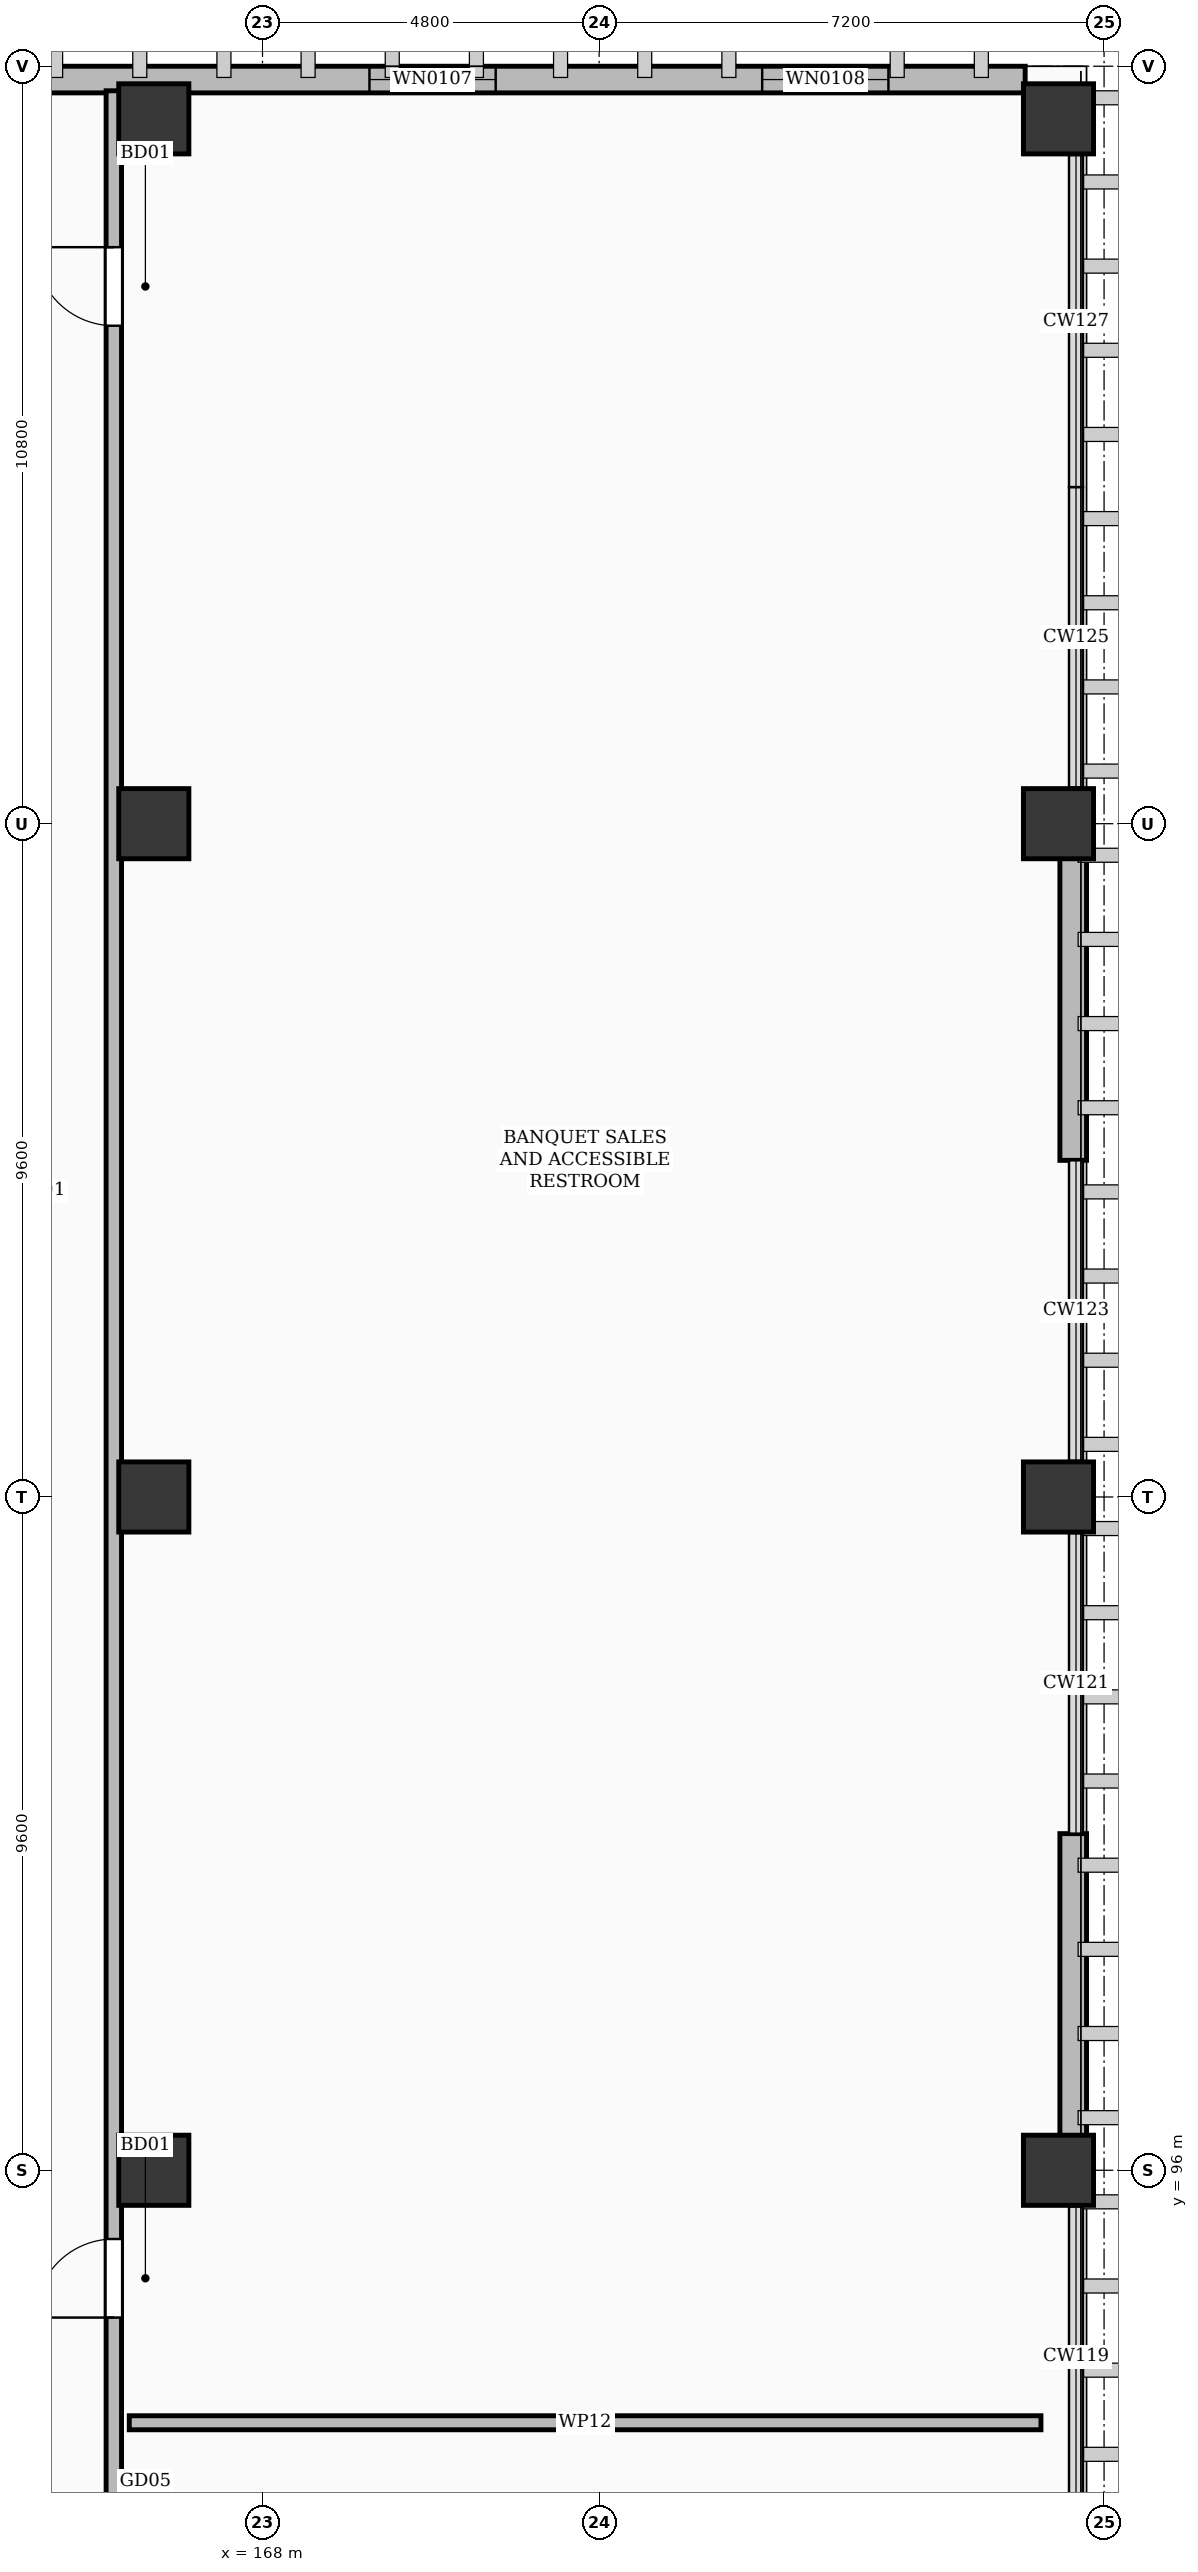
"""IFC4 building model, lengths in metres.
Left out: names, types, materials, properties, quantities, classifications, styles, units other than length and angle.
Written with IfcOpenShell. Run it as: python <this file> out.ifc"""

import sys

from ifc_helpers import new_model, si_unit, direction, frame, frame_2d, origin, origin_2d, place, context, subcontext, project, spatial, rectangle, extrude, element, fill, save


model = new_model("IFC4")
c1 = context("Model", 3, precision=1e-05, world=origin(), true_north=direction((0.0, 1.0)))
c2 = subcontext(c1, "Body", "Model", "MODEL_VIEW")
j1 = project(units=[si_unit("LENGTHUNIT", "METRE"), si_unit("PLANEANGLEUNIT", "RADIAN")], contexts=[c1])
p1 = place(None, origin())
s1 = spatial("IfcSite", under=j1, at=p1, CompositionType="ELEMENT")
p2 = place(p1, origin())
s2 = spatial("IfcBuilding", under=s1, at=p2, CompositionType="ELEMENT")
p3 = place(p2, frame((0.0, 0.0, 6.0)))
s3 = spatial("IfcBuildingStorey", under=s2, at=p3, CompositionType="ELEMENT", Elevation=6.0)
for number, where, z_axis, x_axis in (
    (1, (166.45, 96.0, 0.0), (0.0, 0.0, 1.0), (1.0, 0.0, 0.0)),
    (2, (166.45, 105.6, 0.0), (0.0, 0.0, 1.0), (1.0, 0.0, 0.0)),
    (3, (166.45, 115.2, 0.0), (0.0, 0.0, 1.0), (1.0, 0.0, 0.0)),
    (4, (166.45, 125.25, 0.0), (0.0, 0.0, 1.0), (1.0, 0.0, 0.0)),
    (5, (179.35, 96.0, 0.0), (0.0, 0.0, 1.0), (1.0, 0.0, 0.0)),
    (6, (179.35, 105.6, 0.0), (0.0, 0.0, 1.0), (1.0, 0.0, 0.0)),
    (7, (179.35, 115.2, 0.0), (0.0, 0.0, 1.0), (1.0, 0.0, 0.0)),
    (8, (179.35, 125.25, 0.0), (0.0, 0.0, 1.0), (1.0, 0.0, 0.0)),
):
    element("IfcColumn", number, at=place(p3, frame(where, z_axis=z_axis, x_axis=x_axis)), inside=s3, PredefinedType="COLUMN", context=c2, shape_type="SweptSolid", body=[
        extrude(rectangle(XDim=1.0, YDim=1.0, at=origin_2d()), origin(), (0.0, 0.0, 1.0), 5.4),
    ])
p4 = place(p3, frame((149.925, 125.81, 0.0), z_axis=(0.0, 0.0, 1.0), x_axis=(1.0, 0.0, 0.0)))
e9 = element("IfcWall", 9, at=p4, inside=s3, PredefinedType="SOLIDWALL", context=c2, shape_type="SweptSolid", body=[
    extrude(rectangle(XDim=28.95, YDim=0.38, at=frame_2d((14.475, 0.0))), origin(), (0.0, 0.0, 1.0), 5.1),
])
p5 = place(p4, frame((3.6, 0.0, 0.55)))
e10 = element("IfcOpeningElement", 10, at=p5, cuts=e9, PredefinedType="OPENING", context=c2, shape_type="SweptSolid", body=[
    extrude(rectangle(XDim=1.8, YDim=1.76, at=frame_2d((0.9, 0.88))), frame((0.0, 0.202, 0.0), z_axis=(0.0, -1.0, 0.0), x_axis=(1.0, 0.0, 0.0)), (0.0, 0.0, 1.0), 0.404),
])
p6 = place(p4, frame((9.2, 0.0, 0.55)))
e11 = element("IfcOpeningElement", 11, at=p6, cuts=e9, PredefinedType="OPENING", context=c2, shape_type="SweptSolid", body=[
    extrude(rectangle(XDim=1.8, YDim=1.76, at=frame_2d((0.9, 0.88))), frame((0.0, 0.202, 0.0), z_axis=(0.0, -1.0, 0.0), x_axis=(1.0, 0.0, 0.0)), (0.0, 0.0, 1.0), 0.404),
])
p7 = place(p4, frame((19.6, 0.0, 0.55)))
e12 = element("IfcOpeningElement", 12, at=p7, cuts=e9, PredefinedType="OPENING", context=c2, shape_type="SweptSolid", body=[
    extrude(rectangle(XDim=1.8, YDim=1.76, at=frame_2d((0.9, 0.88))), frame((0.0, 0.202, 0.0), z_axis=(0.0, -1.0, 0.0), x_axis=(1.0, 0.0, 0.0)), (0.0, 0.0, 1.0), 0.404),
])
p8 = place(p4, frame((25.2, 0.0, 0.55)))
e13 = element("IfcOpeningElement", 13, at=p8, cuts=e9, PredefinedType="OPENING", context=c2, shape_type="SweptSolid", body=[
    extrude(rectangle(XDim=1.8, YDim=1.76, at=frame_2d((0.9, 0.88))), frame((0.0, 0.202, 0.0), z_axis=(0.0, -1.0, 0.0), x_axis=(1.0, 0.0, 0.0)), (0.0, 0.0, 1.0), 0.404),
])
p9 = place(p3, frame((179.56, 100.8, 0.0), z_axis=(0.0, 0.0, 1.0), x_axis=(0.0, -1.0, 0.0)))
e14 = element("IfcWall", 14, at=p9, inside=s3, PredefinedType="SOLIDWALL", context=c2, shape_type="SweptSolid", body=[
    extrude(rectangle(XDim=4.325, YDim=0.38, at=frame_2d((2.163, 0.0))), origin(), (0.0, 0.0, 1.0), 4.342),
])
p10 = place(p3, frame((179.56, 114.725, 0.0), z_axis=(0.0, 0.0, 1.0), x_axis=(0.0, -1.0, 0.0)))
e15 = element("IfcWall", 15, at=p10, inside=s3, PredefinedType="SOLIDWALL", context=c2, shape_type="SweptSolid", body=[
    extrude(rectangle(XDim=4.325, YDim=0.38, at=frame_2d((2.163, 0.0))), origin(), (0.0, 0.0, 1.0), 4.342),
])
p11 = place(p3, frame((165.88, 65.4, 0.0), z_axis=(0.0, 0.0, 1.0), x_axis=(0.0, 1.0, 0.0)))
e16 = element("IfcWall", 16, at=p11, inside=s3, PredefinedType="PARTITIONING", context=c2, shape_type="SweptSolid", body=[
    extrude(rectangle(XDim=60.25, YDim=0.22, at=frame_2d((30.125, 0.0))), origin(), (0.0, 0.0, 1.0), 4.312),
])
p12 = place(p11, frame((2.75, 0.0, 0.0)))
e17 = element("IfcOpeningElement", 17, at=p12, cuts=e16, PredefinedType="OPENING", context=c2, shape_type="SweptSolid", body=[
    extrude(rectangle(XDim=1.14, YDim=2.26, at=frame_2d((0.57, 1.13))), frame((0.0, 0.122, 0.0), z_axis=(0.0, -1.0, 0.0), x_axis=(1.0, 0.0, 0.0)), (0.0, 0.0, 1.0), 0.244),
])
p13 = place(p11, frame((23.7, 0.0, 0.0)))
e18 = element("IfcOpeningElement", 18, at=p13, cuts=e16, PredefinedType="OPENING", context=c2, shape_type="SweptSolid", body=[
    extrude(rectangle(XDim=1.14, YDim=2.26, at=frame_2d((0.57, 1.13))), frame((0.0, 0.122, 0.0), z_axis=(0.0, -1.0, 0.0), x_axis=(1.0, 0.0, 0.0)), (0.0, 0.0, 1.0), 0.244),
])
p14 = place(p11, frame((28.5, 0.0, 0.0)))
e19 = element("IfcOpeningElement", 19, at=p14, cuts=e16, PredefinedType="OPENING", context=c2, shape_type="SweptSolid", body=[
    extrude(rectangle(XDim=1.12, YDim=2.15, at=frame_2d((0.56, 1.075))), frame((0.0, 0.122, 0.0), z_axis=(0.0, -1.0, 0.0), x_axis=(1.0, 0.0, 0.0)), (0.0, 0.0, 1.0), 0.244),
])
p15 = place(p11, frame((56.9, 0.0, 0.0)))
e20 = element("IfcOpeningElement", 20, at=p15, cuts=e16, PredefinedType="OPENING", context=c2, shape_type="SweptSolid", body=[
    extrude(rectangle(XDim=1.12, YDim=2.15, at=frame_2d((0.56, 1.075))), frame((0.0, 0.122, 0.0), z_axis=(0.0, -1.0, 0.0), x_axis=(1.0, 0.0, 0.0)), (0.0, 0.0, 1.0), 0.244),
])
p16 = place(p3, frame((166.1, 92.4, 0.0), z_axis=(0.0, 0.0, 1.0), x_axis=(1.0, 0.0, 0.0)))
e21 = element("IfcWall", 21, at=p16, inside=s3, PredefinedType="PARTITIONING", context=c2, shape_type="SweptSolid", body=[
    extrude(rectangle(XDim=13.0, YDim=0.2, at=frame_2d((6.5, 0.0))), origin(), (0.0, 0.0, 1.0), 4.312),
])
p17 = place(p7, origin())
e22 = element("IfcWindow", 22, at=p17, inside=s3, PartitioningType="SINGLE_PANEL", PredefinedType="WINDOW", context=c2, shape_type="SweptSolid", body=[
    extrude(rectangle(XDim=1.8, YDim=1.76, at=frame_2d((0.9, 0.88))), frame((0.0, 0.03, 0.0), z_axis=(0.0, -1.0, 0.0), x_axis=(1.0, 0.0, 0.0)), (0.0, 0.0, 1.0), 0.06),
])
fill(e12, e22)
p18 = place(p8, origin())
e23 = element("IfcWindow", 23, at=p18, inside=s3, PartitioningType="SINGLE_PANEL", PredefinedType="WINDOW", context=c2, shape_type="SweptSolid", body=[
    extrude(rectangle(XDim=1.8, YDim=1.76, at=frame_2d((0.9, 0.88))), frame((0.0, 0.03, 0.0), z_axis=(0.0, -1.0, 0.0), x_axis=(1.0, 0.0, 0.0)), (0.0, 0.0, 1.0), 0.06),
])
fill(e13, e23)
p19 = place(p14, origin())
e24 = element("IfcDoor", 24, at=p19, inside=s3, OperationType="SINGLE_SWING_LEFT", PredefinedType="DOOR", context=c2, shape_type="SweptSolid", body=[
    extrude(rectangle(XDim=1.12, YDim=2.15, at=frame_2d((0.56, 1.075))), frame((0.0, 0.025, 0.0), z_axis=(0.0, -1.0, 0.0), x_axis=(1.0, 0.0, 0.0)), (0.0, 0.0, 1.0), 0.05),
])
fill(e19, e24)
p20 = place(p15, origin())
e25 = element("IfcDoor", 25, at=p20, inside=s3, OperationType="SINGLE_SWING_RIGHT", PredefinedType="DOOR", context=c2, shape_type="SweptSolid", body=[
    extrude(rectangle(XDim=1.12, YDim=2.15, at=frame_2d((0.56, 1.075))), frame((0.0, 0.025, 0.0), z_axis=(0.0, -1.0, 0.0), x_axis=(1.0, 0.0, 0.0)), (0.0, 0.0, 1.0), 0.05),
])
fill(e20, e25)
save(model, sys.argv[1])
